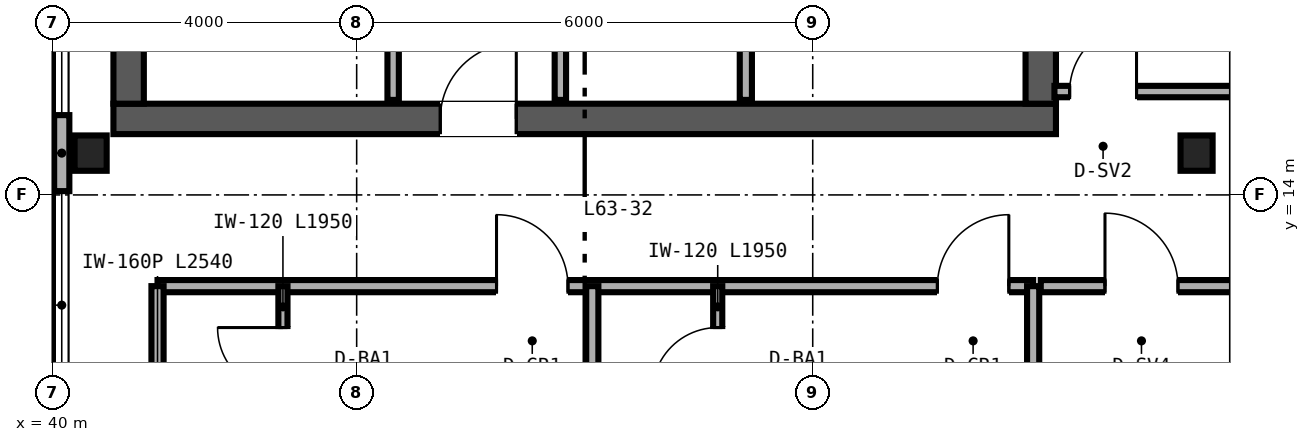
"""IFC4 building model, lengths in metres.
Left out: names, types, materials, properties, quantities, classifications, styles, units other than length and angle.
Written with IfcOpenShell. Run it as: python <this file> out.ifc"""

import sys

from ifc_helpers import new_model, si_unit, direction, frame, frame_2d, origin, origin_2d, place, context, subcontext, project, spatial, rectangle, i_section, extrude, source, transform, mapped, element, fill, save


model = new_model("IFC4")
c1 = context("Model", 3, precision=1e-05, world=origin(), true_north=direction((0.0, 1.0)))
c2 = subcontext(c1, "Body", "Model", "MODEL_VIEW")
j1 = project(units=[si_unit("LENGTHUNIT", "METRE"), si_unit("PLANEANGLEUNIT", "RADIAN")], contexts=[c1])
p1 = place(None, origin())
s1 = spatial("IfcSite", under=j1, at=p1, CompositionType="ELEMENT")
p2 = place(p1, origin())
s2 = spatial("IfcBuilding", under=s1, at=p2, CompositionType="ELEMENT")
p3 = place(p2, frame((0.0, 0.0, 250.8)))
s3 = spatial("IfcBuildingStorey", under=s2, at=p3, CompositionType="ELEMENT", Elevation=250.8)
p4 = place(p3, frame((40.8, 15.0, 0.0), z_axis=(0.0, 0.0, 1.0), x_axis=(1.0, 0.0, 0.0)))
e1 = element("IfcWall", 1, at=p4, inside=s3, PredefinedType="SHEAR", context=c2, shape_type="SweptSolid", body=[
    extrude(rectangle(XDim=12.4, YDim=0.4, at=frame_2d((6.2, 0.0))), origin(), (0.0, 0.0, 1.0), 3.38),
])
p5 = place(p4, frame((4.3, 0.0, 0.0)))
e2 = element("IfcOpeningElement", 2, at=p5, cuts=e1, PredefinedType="OPENING", context=c2, shape_type="SweptSolid", body=[
    extrude(rectangle(XDim=1.0, YDim=2.15, at=frame_2d((0.5, 1.075))), frame((0.0, 0.21, 0.0), z_axis=(0.0, -1.0, 0.0), x_axis=(1.0, 0.0, 0.0)), (0.0, 0.0, 1.0), 0.42),
])
for number, where, z_axis, x_axis in (
    (3, (41.0, 15.2, 0.0), (0.0, 0.0, 1.0), (0.0, 1.0, 0.0)),
    (4, (53.0, 15.2, 0.0), (0.0, 0.0, 1.0), (0.0, 1.0, 0.0)),
):
    element("IfcWall", number, at=place(p3, frame(where, z_axis=z_axis, x_axis=x_axis)), inside=s3, PredefinedType="SHEAR", context=c2, shape_type="SweptSolid", body=[
        extrude(rectangle(XDim=21.6, YDim=0.4, at=frame_2d((10.8, 0.0))), origin(), (0.0, 0.0, 1.0), 3.38),
    ])
m1 = source(origin(), c2, "Body", "SweptSolid", [
    extrude(i_section(OverallWidth=0.422, OverallDepth=0.465, WebThickness=0.045, FlangeThickness=0.073, FilletRadius=0.025, at=origin_2d()), origin(), (0.0, 0.0, 1.0), 3.38),
])
for number, where, z_axis, x_axis in (
    (5, (40.5, 14.55, 0.0), (0.0, 0.0, 1.0), (1.0, 0.0, 0.0)),
    (6, (55.05, 14.55, 0.0), (0.0, 0.0, 1.0), (1.0, 0.0, 0.0)),
):
    element("IfcColumn", number, at=place(p3, frame(where, z_axis=z_axis, x_axis=x_axis)), inside=s3, PredefinedType="COLUMN", context=c2, shape_type="MappedRepresentation", body=[
        mapped(m1, transform((0.0, 0.0, 0.0), scale=1.0)),
    ])
p6 = place(p3, frame((40.12, 14.05, 0.0), z_axis=(0.0, 0.0, 1.0), x_axis=(0.0, 1.0, 0.0)))
e7 = element("IfcWall", 7, at=p6, inside=s3, PredefinedType="PARAPET", context=c2, shape_type="SweptSolid", body=[
    extrude(rectangle(XDim=1.0, YDim=0.2, at=frame_2d((0.5, 0.0))), origin(), (0.0, 0.0, 1.0), 3.38),
])
p7 = place(p3, frame((46.68, 15.25, 0.0), z_axis=(0.0, 0.0, 1.0), x_axis=(0.0, 1.0, 0.0)))
e8 = element("IfcWall", 8, at=p7, inside=s3, PredefinedType="PARTITIONING", context=c2, shape_type="SweptSolid", body=[
    extrude(rectangle(XDim=16.13, YDim=0.15, at=frame_2d((8.065, 0.0))), origin(), (0.0, 0.0, 1.0), 2.453),
])
p8 = place(p7, frame((2.0, 0.0, 0.0)))
e9 = element("IfcOpeningElement", 9, at=p8, cuts=e8, PredefinedType="OPENING", context=c2, shape_type="SweptSolid", body=[
    extrude(rectangle(XDim=0.84, YDim=2.1, at=frame_2d((0.42, 1.05))), frame((0.0, 0.085, 0.0), z_axis=(0.0, -1.0, 0.0), x_axis=(1.0, 0.0, 0.0)), (0.0, 0.0, 1.0), 0.17),
])
p9 = place(p7, frame((7.2, 0.0, 0.0)))
e10 = element("IfcOpeningElement", 10, at=p9, cuts=e8, PredefinedType="OPENING", context=c2, shape_type="SweptSolid", body=[
    extrude(rectangle(XDim=0.84, YDim=2.1, at=frame_2d((0.42, 1.05))), frame((0.0, 0.085, 0.0), z_axis=(0.0, -1.0, 0.0), x_axis=(1.0, 0.0, 0.0)), (0.0, 0.0, 1.0), 0.17),
])
p10 = place(p7, frame((12.6, 0.0, 0.0)))
e11 = element("IfcOpeningElement", 11, at=p10, cuts=e8, PredefinedType="OPENING", context=c2, shape_type="SweptSolid", body=[
    extrude(rectangle(XDim=0.84, YDim=2.1, at=frame_2d((0.42, 1.05))), frame((0.0, 0.085, 0.0), z_axis=(0.0, -1.0, 0.0), x_axis=(1.0, 0.0, 0.0)), (0.0, 0.0, 1.0), 0.17),
])
p11 = place(p3, frame((49.12, 15.25, 0.0), z_axis=(0.0, 0.0, 1.0), x_axis=(0.0, 1.0, 0.0)))
e12 = element("IfcWall", 12, at=p11, inside=s3, PredefinedType="PARTITIONING", context=c2, shape_type="SweptSolid", body=[
    extrude(rectangle(XDim=16.13, YDim=0.16, at=frame_2d((8.065, 0.0))), origin(), (0.0, 0.0, 1.0), 2.453),
])
p12 = place(p11, frame((3.8, 0.0, 0.0)))
e13 = element("IfcOpeningElement", 13, at=p12, cuts=e12, PredefinedType="OPENING", context=c2, shape_type="SweptSolid", body=[
    extrude(rectangle(XDim=0.92, YDim=2.15, at=frame_2d((0.46, 1.075))), frame((0.0, 0.09, 0.0), z_axis=(0.0, -1.0, 0.0), x_axis=(1.0, 0.0, 0.0)), (0.0, 0.0, 1.0), 0.18),
])
p13 = place(p11, frame((11.8, 0.0, 0.0)))
e14 = element("IfcOpeningElement", 14, at=p13, cuts=e12, PredefinedType="OPENING", context=c2, shape_type="SweptSolid", body=[
    extrude(rectangle(XDim=0.9, YDim=2.15, at=frame_2d((0.45, 1.075))), frame((0.0, 0.09, 0.0), z_axis=(0.0, -1.0, 0.0), x_axis=(1.0, 0.0, 0.0)), (0.0, 0.0, 1.0), 0.18),
])
p14 = place(p3, frame((44.48, 15.25, 0.0), z_axis=(0.0, 0.0, 1.0), x_axis=(0.0, 1.0, 0.0)))
e15 = element("IfcWall", 15, at=p14, inside=s3, PredefinedType="PARTITIONING", context=c2, shape_type="SweptSolid", body=[
    extrude(rectangle(XDim=16.13, YDim=0.15, at=frame_2d((8.065, 0.0))), origin(), (0.0, 0.0, 1.0), 2.453),
])
p15 = place(p14, frame((1.6, 0.0, 0.0)))
e16 = element("IfcOpeningElement", 16, at=p15, cuts=e15, PredefinedType="OPENING", context=c2, shape_type="SweptSolid", body=[
    extrude(rectangle(XDim=0.84, YDim=2.1, at=frame_2d((0.42, 1.05))), frame((0.0, 0.085, 0.0), z_axis=(0.0, -1.0, 0.0), x_axis=(1.0, 0.0, 0.0)), (0.0, 0.0, 1.0), 0.17),
])
p16 = place(p14, frame((5.85, 0.0, 0.0)))
e17 = element("IfcOpeningElement", 17, at=p16, cuts=e15, PredefinedType="OPENING", context=c2, shape_type="SweptSolid", body=[
    extrude(rectangle(XDim=0.84, YDim=2.1, at=frame_2d((0.42, 1.05))), frame((0.0, 0.085, 0.0), z_axis=(0.0, -1.0, 0.0), x_axis=(1.0, 0.0, 0.0)), (0.0, 0.0, 1.0), 0.17),
])
p17 = place(p14, frame((10.05, 0.0, 0.0)))
e18 = element("IfcOpeningElement", 18, at=p17, cuts=e15, PredefinedType="OPENING", context=c2, shape_type="SweptSolid", body=[
    extrude(rectangle(XDim=0.84, YDim=2.1, at=frame_2d((0.42, 1.05))), frame((0.0, 0.085, 0.0), z_axis=(0.0, -1.0, 0.0), x_axis=(1.0, 0.0, 0.0)), (0.0, 0.0, 1.0), 0.17),
])
p18 = place(p3, frame((41.38, 12.8, 0.0), z_axis=(0.0, 0.0, 1.0), x_axis=(1.0, 0.0, 0.0)))
e19 = element("IfcWall", 19, at=p18, inside=s3, PredefinedType="PARTITIONING", context=c2, shape_type="SweptSolid", body=[
    extrude(rectangle(XDim=11.52, YDim=0.16, at=frame_2d((5.76, 0.0))), origin(), (0.0, 0.0, 1.0), 3.38),
])
p19 = place(p18, frame((4.46, 0.0, 0.0)))
e20 = element("IfcOpeningElement", 20, at=p19, cuts=e19, PredefinedType="OPENING", context=c2, shape_type="SweptSolid", body=[
    extrude(rectangle(XDim=0.94, YDim=2.15, at=frame_2d((0.47, 1.075))), frame((0.0, 0.09, 0.0), z_axis=(0.0, -1.0, 0.0), x_axis=(1.0, 0.0, 0.0)), (0.0, 0.0, 1.0), 0.18),
])
p20 = place(p18, frame((10.26, 0.0, 0.0)))
e21 = element("IfcOpeningElement", 21, at=p20, cuts=e19, PredefinedType="OPENING", context=c2, shape_type="SweptSolid", body=[
    extrude(rectangle(XDim=0.94, YDim=2.15, at=frame_2d((0.47, 1.075))), frame((0.0, 0.09, 0.0), z_axis=(0.0, -1.0, 0.0), x_axis=(1.0, 0.0, 0.0)), (0.0, 0.0, 1.0), 0.18),
])
p21 = place(p3, frame((41.38, 10.26, 0.0), z_axis=(0.0, 0.0, 1.0), x_axis=(0.0, 1.0, 0.0)))
e22 = element("IfcWall", 22, at=p21, inside=s3, PredefinedType="PARTITIONING", context=c2, shape_type="SweptSolid", body=[
    extrude(rectangle(XDim=2.54, YDim=0.16, at=frame_2d((1.27, 0.0))), origin(), (0.0, 0.0, 1.0), 3.38),
])
p22 = place(p3, frame((52.9, 9.26, 0.0), z_axis=(0.0, 0.0, 1.0), x_axis=(0.0, 1.0, 0.0)))
e23 = element("IfcWall", 23, at=p22, inside=s3, PredefinedType="PARTITIONING", context=c2, shape_type="SweptSolid", body=[
    extrude(rectangle(XDim=3.54, YDim=0.16, at=frame_2d((1.77, 0.0))), origin(), (0.0, 0.0, 1.0), 3.38),
])
p23 = place(p3, frame((47.1, 8.36, 0.0), z_axis=(0.0, 0.0, 1.0), x_axis=(0.0, 1.0, 0.0)))
e24 = element("IfcWall", 24, at=p23, inside=s3, PredefinedType="PARTITIONING", context=c2, shape_type="SweptSolid", body=[
    extrude(rectangle(XDim=4.44, YDim=0.16, at=frame_2d((2.22, 0.0))), origin(), (0.0, 0.0, 1.0), 2.687),
])
p24 = place(p3, frame((43.03, 10.85, 0.0), z_axis=(0.0, 0.0, 1.0), x_axis=(0.0, 1.0, 0.0)))
e25 = element("IfcWall", 25, at=p24, inside=s3, PredefinedType="PARTITIONING", context=c2, shape_type="SweptSolid", body=[
    extrude(rectangle(XDim=1.95, YDim=0.12, at=frame_2d((0.975, 0.0))), origin(), (0.0, 0.0, 1.0), 3.38),
])
p25 = place(p24, frame((0.545, 0.0, 0.0)))
e26 = element("IfcOpeningElement", 26, at=p25, cuts=e25, PredefinedType="OPENING", context=c2, shape_type="SweptSolid", body=[
    extrude(rectangle(XDim=0.86, YDim=2.1, at=frame_2d((0.43, 1.05))), frame((0.0, 0.07, 0.0), z_axis=(0.0, -1.0, 0.0), x_axis=(1.0, 0.0, 0.0)), (0.0, 0.0, 1.0), 0.14),
])
p26 = place(p3, frame((48.75, 10.85, 0.0), z_axis=(0.0, 0.0, 1.0), x_axis=(0.0, 1.0, 0.0)))
e27 = element("IfcWall", 27, at=p26, inside=s3, PredefinedType="PARTITIONING", context=c2, shape_type="SweptSolid", body=[
    extrude(rectangle(XDim=1.95, YDim=0.12, at=frame_2d((0.975, 0.0))), origin(), (0.0, 0.0, 1.0), 3.38),
])
p27 = place(p26, frame((0.545, 0.0, 0.0)))
e28 = element("IfcOpeningElement", 28, at=p27, cuts=e27, PredefinedType="OPENING", context=c2, shape_type="SweptSolid", body=[
    extrude(rectangle(XDim=0.86, YDim=2.1, at=frame_2d((0.43, 1.05))), frame((0.0, 0.07, 0.0), z_axis=(0.0, -1.0, 0.0), x_axis=(1.0, 0.0, 0.0)), (0.0, 0.0, 1.0), 0.14),
])
p28 = place(p3, frame((53.18, 15.36, 0.0), z_axis=(0.0, 0.0, 1.0), x_axis=(1.0, 0.0, 0.0)))
e29 = element("IfcWall", 29, at=p28, inside=s3, PredefinedType="PARTITIONING", context=c2, shape_type="SweptSolid", body=[
    extrude(rectangle(XDim=2.66, YDim=0.15, at=frame_2d((1.33, 0.0))), origin(), (0.0, 0.0, 1.0), 2.601),
])
p29 = place(p28, frame((0.2, 0.0, 0.0)))
e30 = element("IfcOpeningElement", 30, at=p29, cuts=e29, PredefinedType="OPENING", context=c2, shape_type="SweptSolid", body=[
    extrude(rectangle(XDim=0.88, YDim=2.15, at=frame_2d((0.44, 1.075))), frame((0.0, 0.085, 0.0), z_axis=(0.0, -1.0, 0.0), x_axis=(1.0, 0.0, 0.0)), (0.0, 0.0, 1.0), 0.17),
])
p30 = place(p3, frame((53.0, 12.8, 0.0), z_axis=(0.0, 0.0, 1.0), x_axis=(1.0, 0.0, 0.0)))
e31 = element("IfcWall", 31, at=p30, inside=s3, PredefinedType="PARTITIONING", context=c2, shape_type="SweptSolid", body=[
    extrude(rectangle(XDim=2.65, YDim=0.16, at=frame_2d((1.325, 0.0))), origin(), (0.0, 0.0, 1.0), 3.38),
])
p31 = place(p30, frame((0.845, 0.0, 0.0)))
e32 = element("IfcOpeningElement", 32, at=p31, cuts=e31, PredefinedType="OPENING", context=c2, shape_type="SweptSolid", body=[
    extrude(rectangle(XDim=0.96, YDim=2.15, at=frame_2d((0.48, 1.075))), frame((0.0, 0.09, 0.0), z_axis=(0.0, -1.0, 0.0), x_axis=(1.0, 0.0, 0.0)), (0.0, 0.0, 1.0), 0.18),
])
m2 = source(origin(), c2, "Body", "SweptSolid", [
    extrude(rectangle(XDim=1.0, YDim=2.15, at=frame_2d((0.5, 1.075))), frame((0.0, 0.025, 0.0), z_axis=(0.0, -1.0, 0.0), x_axis=(1.0, 0.0, 0.0)), (0.0, 0.0, 1.0), 0.05),
])
p32 = place(p5, origin())
e33 = element("IfcDoor", 33, at=p32, inside=s3, OperationType="SINGLE_SWING_RIGHT", PredefinedType="DOOR", context=c2, shape_type="MappedRepresentation", body=[
    mapped(m2, transform((0.0, 0.0, 0.0), scale=1.0)),
])
fill(e2, e33)
m3 = source(origin(), c2, "Body", "SweptSolid", [
    extrude(rectangle(XDim=0.86, YDim=2.1, at=frame_2d((0.43, 1.05))), frame((0.0, 0.025, 0.0), z_axis=(0.0, -1.0, 0.0), x_axis=(1.0, 0.0, 0.0)), (0.0, 0.0, 1.0), 0.05),
])
p33 = place(p25, origin())
e34 = element("IfcDoor", 34, at=p33, inside=s3, OperationType="SINGLE_SWING_RIGHT", PredefinedType="DOOR", context=c2, shape_type="MappedRepresentation", body=[
    mapped(m3, transform((0.0, 0.0, 0.0), scale=1.0)),
])
fill(e26, e34)
p34 = place(p27, origin())
e35 = element("IfcDoor", 35, at=p34, inside=s3, OperationType="SINGLE_SWING_LEFT", PredefinedType="DOOR", context=c2, shape_type="MappedRepresentation", body=[
    mapped(m3, transform((0.0, 0.0, 0.0), scale=1.0)),
])
fill(e28, e35)
m4 = source(origin(), c2, "Body", "SweptSolid", [
    extrude(rectangle(XDim=0.94, YDim=2.15, at=frame_2d((0.47, 1.075))), frame((0.0, 0.025, 0.0), z_axis=(0.0, -1.0, 0.0), x_axis=(1.0, 0.0, 0.0)), (0.0, 0.0, 1.0), 0.05),
])
p35 = place(p19, origin())
e36 = element("IfcDoor", 36, at=p35, inside=s3, OperationType="SINGLE_SWING_LEFT", PredefinedType="DOOR", context=c2, shape_type="MappedRepresentation", body=[
    mapped(m4, transform((0.0, 0.0, 0.0), scale=1.0)),
])
fill(e20, e36)
p36 = place(p20, origin())
e37 = element("IfcDoor", 37, at=p36, inside=s3, OperationType="SINGLE_SWING_RIGHT", PredefinedType="DOOR", context=c2, shape_type="MappedRepresentation", body=[
    mapped(m4, transform((0.0, 0.0, 0.0), scale=1.0)),
])
fill(e21, e37)
m5 = source(origin(), c2, "Body", "SweptSolid", [
    extrude(rectangle(XDim=0.88, YDim=2.15, at=frame_2d((0.44, 1.075))), frame((0.0, 0.025, 0.0), z_axis=(0.0, -1.0, 0.0), x_axis=(1.0, 0.0, 0.0)), (0.0, 0.0, 1.0), 0.05),
])
p37 = place(p29, origin())
e38 = element("IfcDoor", 38, at=p37, inside=s3, OperationType="SINGLE_SWING_RIGHT", PredefinedType="DOOR", context=c2, shape_type="MappedRepresentation", body=[
    mapped(m5, transform((0.0, 0.0, 0.0), scale=1.0)),
])
fill(e30, e38)
m6 = source(origin(), c2, "Body", "SweptSolid", [
    extrude(rectangle(XDim=0.96, YDim=2.15, at=frame_2d((0.48, 1.075))), frame((0.0, 0.025, 0.0), z_axis=(0.0, -1.0, 0.0), x_axis=(1.0, 0.0, 0.0)), (0.0, 0.0, 1.0), 0.05),
])
p38 = place(p31, origin())
e39 = element("IfcDoor", 39, at=p38, inside=s3, OperationType="SINGLE_SWING_LEFT", PredefinedType="DOOR", context=c2, shape_type="MappedRepresentation", body=[
    mapped(m6, transform((0.0, 0.0, 0.0), scale=1.0)),
])
fill(e32, e39)
save(model, sys.argv[1])
